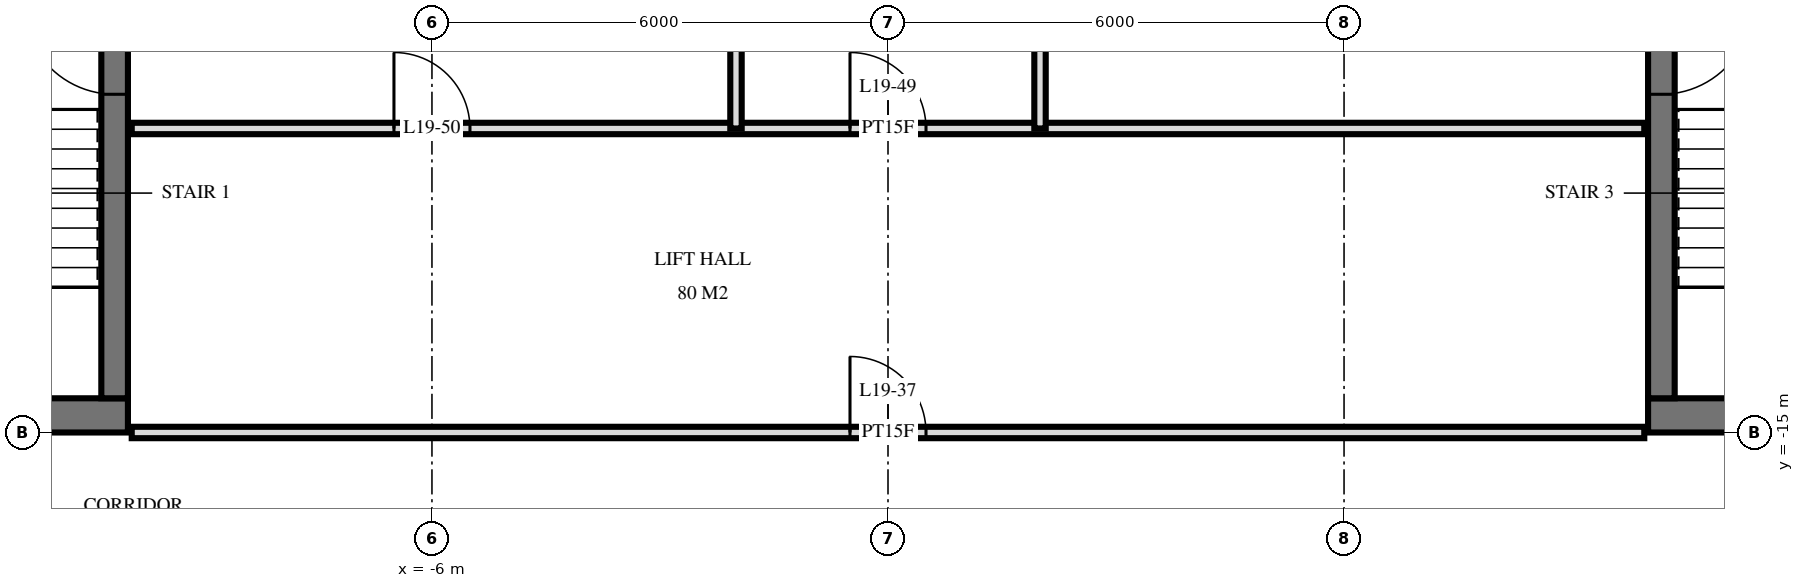
"""IFC4 building model, lengths in metres.
Left out: names, types, materials, properties, quantities, classifications, styles, units other than length and angle.
Written with IfcOpenShell. Run it as: python <this file> out.ifc"""

import sys

from ifc_helpers import new_model, si_unit, direction, frame, frame_2d, origin, place, context, subcontext, project, spatial, rectangle, extrude, element, fill, save


model = new_model("IFC4")
c1 = context("Model", 3, precision=1e-05, world=origin(), true_north=direction((0.0, 1.0)))
c2 = subcontext(c1, "Body", "Model", "MODEL_VIEW")
j1 = project(units=[si_unit("LENGTHUNIT", "METRE"), si_unit("PLANEANGLEUNIT", "RADIAN")], contexts=[c1])
p1 = place(None, origin())
s1 = spatial("IfcSite", under=j1, at=p1, CompositionType="ELEMENT")
p2 = place(p1, origin())
s2 = spatial("IfcBuilding", under=s1, at=p2, CompositionType="ELEMENT")
p3 = place(p2, frame((0.0, 0.0, 78.0)))
s3 = spatial("IfcBuildingStorey", under=s2, at=p3, CompositionType="ELEMENT", Elevation=78.0)
p4 = place(p3, frame((-29.5, -14.775, 0.0), z_axis=(0.0, 0.0, 1.0), x_axis=(1.0, 0.0, 0.0)))
e1 = element("IfcWall", 1, at=p4, inside=s3, PredefinedType="SHEAR", context=c2, shape_type="SweptSolid", body=[
    extrude(rectangle(XDim=19.5, YDim=0.45, at=frame_2d((9.75, 0.0))), origin(), (0.0, 0.0, 1.0), 3.6),
])
p5 = place(p4, frame((11.2, 0.0, 0.0)))
e2 = element("IfcOpeningElement", 2, at=p5, cuts=e1, PredefinedType="OPENING", context=c2, shape_type="SweptSolid", body=[
    extrude(rectangle(XDim=1.2, YDim=2.1, at=frame_2d((0.6, 1.05))), frame((0.0, 0.235, 0.0), z_axis=(0.0, -1.0, 0.0), x_axis=(1.0, 0.0, 0.0)), (0.0, 0.0, 1.0), 0.47),
])
p6 = place(p4, frame((14.25, 0.0, 0.0)))
e3 = element("IfcOpeningElement", 3, at=p6, cuts=e1, PredefinedType="OPENING", context=c2, shape_type="SweptSolid", body=[
    extrude(rectangle(XDim=1.1, YDim=2.1, at=frame_2d((0.55, 1.05))), frame((0.0, 0.235, 0.0), z_axis=(0.0, -1.0, 0.0), x_axis=(1.0, 0.0, 0.0)), (0.0, 0.0, 1.0), 0.47),
])
p7 = place(p4, frame((8.5, 0.0, 0.0)))
e4 = element("IfcOpeningElement", 4, at=p7, cuts=e1, PredefinedType="OPENING", context=c2, shape_type="SweptSolid", body=[
    extrude(rectangle(XDim=0.9, YDim=2.1, at=frame_2d((0.45, 1.05))), frame((0.0, 0.235, 0.0), z_axis=(0.0, -1.0, 0.0), x_axis=(1.0, 0.0, 0.0)), (0.0, 0.0, 1.0), 0.47),
])
p8 = place(p4, frame((6.05, 0.0, 0.0)))
e5 = element("IfcOpeningElement", 5, at=p8, cuts=e1, PredefinedType="OPENING", context=c2, shape_type="SweptSolid", body=[
    extrude(rectangle(XDim=1.0, YDim=2.1, at=frame_2d((0.5, 1.05))), frame((0.0, 0.235, 0.0), z_axis=(0.0, -1.0, 0.0), x_axis=(1.0, 0.0, 0.0)), (0.0, 0.0, 1.0), 0.47),
])
p9 = place(p4, frame((2.988, 0.0, 0.0)))
e6 = element("IfcOpeningElement", 6, at=p9, cuts=e1, PredefinedType="OPENING", context=c2, shape_type="SweptSolid", body=[
    extrude(rectangle(XDim=1.0, YDim=2.1, at=frame_2d((0.5, 1.05))), frame((0.0, 0.235, 0.0), z_axis=(0.0, -1.0, 0.0), x_axis=(1.0, 0.0, 0.0)), (0.0, 0.0, 1.0), 0.47),
])
p10 = place(p4, frame((0.663, 0.0, 0.0)))
e7 = element("IfcOpeningElement", 7, at=p10, cuts=e1, PredefinedType="OPENING", context=c2, shape_type="SweptSolid", body=[
    extrude(rectangle(XDim=1.0, YDim=2.1, at=frame_2d((0.5, 1.05))), frame((0.0, 0.235, 0.0), z_axis=(0.0, -1.0, 0.0), x_axis=(1.0, 0.0, 0.0)), (0.0, 0.0, 1.0), 0.47),
])
p11 = place(p3, frame((-10.175, -14.55, 0.0), z_axis=(0.0, 0.0, 1.0), x_axis=(0.0, 1.0, 0.0)))
e8 = element("IfcWall", 8, at=p11, inside=s3, PredefinedType="SHEAR", context=c2, shape_type="SweptSolid", body=[
    extrude(rectangle(XDim=14.1, YDim=0.35, at=frame_2d((7.05, 0.0))), origin(), (0.0, 0.0, 1.0), 3.6),
])
p12 = place(p11, frame((8.4, 0.0, 0.0)))
e9 = element("IfcOpeningElement", 9, at=p12, cuts=e8, PredefinedType="OPENING", context=c2, shape_type="SweptSolid", body=[
    extrude(rectangle(XDim=1.4, YDim=2.4, at=frame_2d((0.7, 1.2))), frame((0.0, 0.185, 0.0), z_axis=(0.0, -1.0, 0.0), x_axis=(1.0, 0.0, 0.0)), (0.0, 0.0, 1.0), 0.37),
])
p13 = place(p11, frame((10.0, 0.0, 0.0)))
e10 = element("IfcOpeningElement", 10, at=p13, cuts=e8, PredefinedType="OPENING", context=c2, shape_type="SweptSolid", body=[
    extrude(rectangle(XDim=1.4, YDim=2.4, at=frame_2d((0.7, 1.2))), frame((0.0, 0.185, 0.0), z_axis=(0.0, -1.0, 0.0), x_axis=(1.0, 0.0, 0.0)), (0.0, 0.0, 1.0), 0.37),
])
p14 = place(p11, frame((4.0, 0.0, 0.0)))
e11 = element("IfcOpeningElement", 11, at=p14, cuts=e8, PredefinedType="OPENING", context=c2, shape_type="SweptSolid", body=[
    extrude(rectangle(XDim=1.2, YDim=2.1, at=frame_2d((0.6, 1.05))), frame((0.0, 0.185, 0.0), z_axis=(0.0, -1.0, 0.0), x_axis=(1.0, 0.0, 0.0)), (0.0, 0.0, 1.0), 0.37),
])
p15 = place(p3, frame((10.0, -14.775, 0.0), z_axis=(0.0, 0.0, 1.0), x_axis=(1.0, 0.0, 0.0)))
e12 = element("IfcWall", 12, at=p15, inside=s3, PredefinedType="SHEAR", context=c2, shape_type="SweptSolid", body=[
    extrude(rectangle(XDim=19.5, YDim=0.45, at=frame_2d((9.75, 0.0))), origin(), (0.0, 0.0, 1.0), 3.6),
])
p16 = place(p15, frame((7.1, 0.0, 0.0)))
e13 = element("IfcOpeningElement", 13, at=p16, cuts=e12, PredefinedType="OPENING", context=c2, shape_type="SweptSolid", body=[
    extrude(rectangle(XDim=1.2, YDim=2.1, at=frame_2d((0.6, 1.05))), frame((0.0, 0.235, 0.0), z_axis=(0.0, -1.0, 0.0), x_axis=(1.0, 0.0, 0.0)), (0.0, 0.0, 1.0), 0.47),
])
p17 = place(p15, frame((4.15, 0.0, 0.0)))
e14 = element("IfcOpeningElement", 14, at=p17, cuts=e12, PredefinedType="OPENING", context=c2, shape_type="SweptSolid", body=[
    extrude(rectangle(XDim=1.1, YDim=2.1, at=frame_2d((0.55, 1.05))), frame((0.0, 0.235, 0.0), z_axis=(0.0, -1.0, 0.0), x_axis=(1.0, 0.0, 0.0)), (0.0, 0.0, 1.0), 0.47),
])
p18 = place(p15, frame((10.1, 0.0, 0.0)))
e15 = element("IfcOpeningElement", 15, at=p18, cuts=e12, PredefinedType="OPENING", context=c2, shape_type="SweptSolid", body=[
    extrude(rectangle(XDim=0.9, YDim=2.1, at=frame_2d((0.45, 1.05))), frame((0.0, 0.235, 0.0), z_axis=(0.0, -1.0, 0.0), x_axis=(1.0, 0.0, 0.0)), (0.0, 0.0, 1.0), 0.47),
])
p19 = place(p15, frame((12.45, 0.0, 0.0)))
e16 = element("IfcOpeningElement", 16, at=p19, cuts=e12, PredefinedType="OPENING", context=c2, shape_type="SweptSolid", body=[
    extrude(rectangle(XDim=1.0, YDim=2.1, at=frame_2d((0.5, 1.05))), frame((0.0, 0.235, 0.0), z_axis=(0.0, -1.0, 0.0), x_axis=(1.0, 0.0, 0.0)), (0.0, 0.0, 1.0), 0.47),
])
p20 = place(p15, frame((15.512, 0.0, 0.0)))
e17 = element("IfcOpeningElement", 17, at=p20, cuts=e12, PredefinedType="OPENING", context=c2, shape_type="SweptSolid", body=[
    extrude(rectangle(XDim=1.0, YDim=2.1, at=frame_2d((0.5, 1.05))), frame((0.0, 0.235, 0.0), z_axis=(0.0, -1.0, 0.0), x_axis=(1.0, 0.0, 0.0)), (0.0, 0.0, 1.0), 0.47),
])
p21 = place(p15, frame((17.837, 0.0, 0.0)))
e18 = element("IfcOpeningElement", 18, at=p21, cuts=e12, PredefinedType="OPENING", context=c2, shape_type="SweptSolid", body=[
    extrude(rectangle(XDim=1.0, YDim=2.1, at=frame_2d((0.5, 1.05))), frame((0.0, 0.235, 0.0), z_axis=(0.0, -1.0, 0.0), x_axis=(1.0, 0.0, 0.0)), (0.0, 0.0, 1.0), 0.47),
])
p22 = place(p3, frame((10.175, -14.55, 0.0), z_axis=(0.0, 0.0, 1.0), x_axis=(0.0, 1.0, 0.0)))
e19 = element("IfcWall", 19, at=p22, inside=s3, PredefinedType="SHEAR", context=c2, shape_type="SweptSolid", body=[
    extrude(rectangle(XDim=14.1, YDim=0.35, at=frame_2d((7.05, 0.0))), origin(), (0.0, 0.0, 1.0), 3.6),
])
p23 = place(p22, frame((8.4, 0.0, 0.0)))
e20 = element("IfcOpeningElement", 20, at=p23, cuts=e19, PredefinedType="OPENING", context=c2, shape_type="SweptSolid", body=[
    extrude(rectangle(XDim=1.4, YDim=2.4, at=frame_2d((0.7, 1.2))), frame((0.0, 0.185, 0.0), z_axis=(0.0, -1.0, 0.0), x_axis=(1.0, 0.0, 0.0)), (0.0, 0.0, 1.0), 0.37),
])
p24 = place(p22, frame((10.0, 0.0, 0.0)))
e21 = element("IfcOpeningElement", 21, at=p24, cuts=e19, PredefinedType="OPENING", context=c2, shape_type="SweptSolid", body=[
    extrude(rectangle(XDim=1.4, YDim=2.4, at=frame_2d((0.7, 1.2))), frame((0.0, 0.185, 0.0), z_axis=(0.0, -1.0, 0.0), x_axis=(1.0, 0.0, 0.0)), (0.0, 0.0, 1.0), 0.37),
])
p25 = place(p22, frame((4.0, 0.0, 0.0)))
e22 = element("IfcOpeningElement", 22, at=p25, cuts=e19, PredefinedType="OPENING", context=c2, shape_type="SweptSolid", body=[
    extrude(rectangle(XDim=1.2, YDim=2.1, at=frame_2d((0.6, 1.05))), frame((0.0, 0.185, 0.0), z_axis=(0.0, -1.0, 0.0), x_axis=(1.0, 0.0, 0.0)), (0.0, 0.0, 1.0), 0.37),
])
for number, where, z_axis, x_axis in (
    (23, (2.0, -11.0, 0.0), (0.0, 0.0, 1.0), (0.0, 1.0, 0.0)),
    (24, (-2.0, -11.0, 0.0), (0.0, 0.0, 1.0), (0.0, 1.0, 0.0)),
):
    element("IfcWall", number, at=place(p3, frame(where, z_axis=z_axis, x_axis=x_axis)), inside=s3, PredefinedType="PARTITIONING", context=c2, shape_type="SweptSolid", body=[
        extrude(rectangle(XDim=4.0, YDim=0.15, at=frame_2d((2.0, 0.0))), origin(), (0.0, 0.0, 1.0), 3.32),
    ])
p26 = place(p3, frame((-9.95, -15.0, 0.0), z_axis=(0.0, 0.0, 1.0), x_axis=(1.0, 0.0, 0.0)))
e25 = element("IfcWall", 25, at=p26, inside=s3, PredefinedType="PARTITIONING", context=c2, shape_type="SweptSolid", body=[
    extrude(rectangle(XDim=19.9, YDim=0.15, at=frame_2d((9.95, 0.0))), origin(), (0.0, 0.0, 1.0), 2.684),
])
p27 = place(p26, frame((9.45, 0.0, 0.0)))
e26 = element("IfcOpeningElement", 26, at=p27, cuts=e25, PredefinedType="OPENING", context=c2, shape_type="SweptSolid", body=[
    extrude(rectangle(XDim=1.0, YDim=2.1, at=frame_2d((0.5, 1.05))), frame((0.0, 0.085, 0.0), z_axis=(0.0, -1.0, 0.0), x_axis=(1.0, 0.0, 0.0)), (0.0, 0.0, 1.0), 0.17),
])
p28 = place(p3, frame((-9.95, -11.0, 0.0), z_axis=(0.0, 0.0, 1.0), x_axis=(1.0, 0.0, 0.0)))
e27 = element("IfcWall", 27, at=p28, inside=s3, PredefinedType="PARTITIONING", context=c2, shape_type="SweptSolid", body=[
    extrude(rectangle(XDim=19.9, YDim=0.15, at=frame_2d((9.95, 0.0))), origin(), (0.0, 0.0, 1.0), 3.32),
])
p29 = place(p28, frame((9.45, 0.0, 0.0)))
e28 = element("IfcOpeningElement", 28, at=p29, cuts=e27, PredefinedType="OPENING", context=c2, shape_type="SweptSolid", body=[
    extrude(rectangle(XDim=1.0, YDim=2.1, at=frame_2d((0.5, 1.05))), frame((0.0, 0.085, 0.0), z_axis=(0.0, -1.0, 0.0), x_axis=(1.0, 0.0, 0.0)), (0.0, 0.0, 1.0), 0.17),
])
p30 = place(p28, frame((3.45, 0.0, 0.0)))
e29 = element("IfcOpeningElement", 29, at=p30, cuts=e27, PredefinedType="OPENING", context=c2, shape_type="SweptSolid", body=[
    extrude(rectangle(XDim=1.0, YDim=2.1, at=frame_2d((0.5, 1.05))), frame((0.0, 0.085, 0.0), z_axis=(0.0, -1.0, 0.0), x_axis=(1.0, 0.0, 0.0)), (0.0, 0.0, 1.0), 0.17),
])
p31 = place(p14, origin())
e30 = element("IfcDoor", 30, at=p31, inside=s3, OperationType="SINGLE_SWING_LEFT", PredefinedType="DOOR", context=c2, shape_type="SweptSolid", body=[
    extrude(rectangle(XDim=1.2, YDim=2.1, at=frame_2d((0.6, 1.05))), frame((0.0, 0.025, 0.0), z_axis=(0.0, -1.0, 0.0), x_axis=(1.0, 0.0, 0.0)), (0.0, 0.0, 1.0), 0.05),
])
fill(e11, e30)
p32 = place(p25, frame((0.6, 0.0, 0.0), z_axis=(0.0, 0.0, 1.0), x_axis=(-1.0, 0.0, 0.0)))
e31 = element("IfcDoor", 31, at=p32, inside=s3, OperationType="SINGLE_SWING_RIGHT", PredefinedType="DOOR", context=c2, shape_type="SweptSolid", body=[
    extrude(rectangle(XDim=1.2, YDim=2.1, at=frame_2d((0.0, 1.05))), frame((0.0, -0.025, 0.0), z_axis=(0.0, 1.0, 0.0), x_axis=(-1.0, 0.0, 0.0)), (0.0, 0.0, 1.0), 0.05),
])
fill(e22, e31)
p33 = place(p27, origin())
e32 = element("IfcDoor", 32, at=p33, inside=s3, OperationType="SINGLE_SWING_RIGHT", PredefinedType="DOOR", context=c2, shape_type="SweptSolid", body=[
    extrude(rectangle(XDim=1.0, YDim=2.1, at=frame_2d((0.5, 1.05))), frame((0.0, 0.025, 0.0), z_axis=(0.0, -1.0, 0.0), x_axis=(1.0, 0.0, 0.0)), (0.0, 0.0, 1.0), 0.05),
])
fill(e26, e32)
p34 = place(p29, origin())
e33 = element("IfcDoor", 33, at=p34, inside=s3, OperationType="SINGLE_SWING_RIGHT", PredefinedType="DOOR", context=c2, shape_type="SweptSolid", body=[
    extrude(rectangle(XDim=1.0, YDim=2.1, at=frame_2d((0.5, 1.05))), frame((0.0, 0.025, 0.0), z_axis=(0.0, -1.0, 0.0), x_axis=(1.0, 0.0, 0.0)), (0.0, 0.0, 1.0), 0.05),
])
fill(e28, e33)
p35 = place(p30, origin())
e34 = element("IfcDoor", 34, at=p35, inside=s3, OperationType="SINGLE_SWING_RIGHT", PredefinedType="DOOR", context=c2, shape_type="SweptSolid", body=[
    extrude(rectangle(XDim=1.0, YDim=2.1, at=frame_2d((0.5, 1.05))), frame((0.0, 0.025, 0.0), z_axis=(0.0, -1.0, 0.0), x_axis=(1.0, 0.0, 0.0)), (0.0, 0.0, 1.0), 0.05),
])
fill(e29, e34)
save(model, sys.argv[1])
